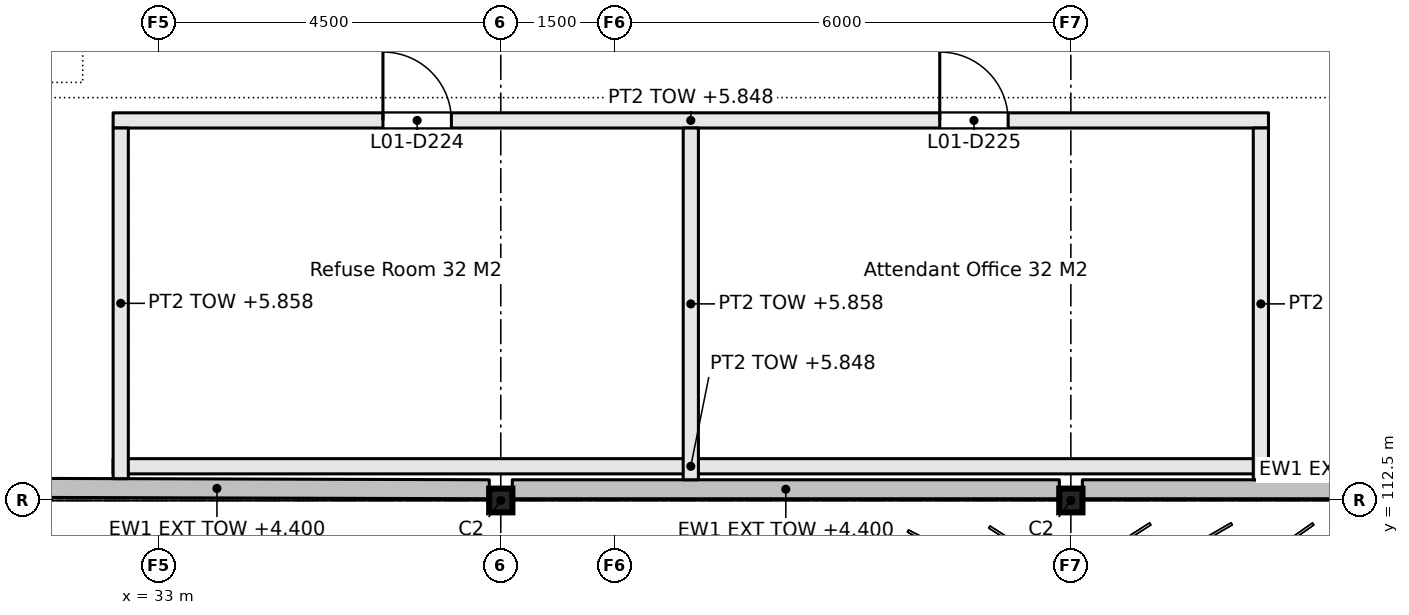
"""IFC4 building model, lengths in metres.
Left out: names, types, materials, properties, quantities, classifications, styles, units other than length and angle.
Written with IfcOpenShell. Run it as: python <this file> out.ifc"""

import sys

from ifc_helpers import new_model, si_unit, direction, frame, frame_2d, origin, origin_2d, place, context, subcontext, project, spatial, rectangle, i_section, extrude, element, fill, save


model = new_model("IFC4")
c1 = context("Model", 3, precision=1e-05, world=origin(), true_north=direction((0.0, 1.0)))
c2 = subcontext(c1, "Body", "Model", "MODEL_VIEW")
j1 = project(units=[si_unit("LENGTHUNIT", "METRE"), si_unit("PLANEANGLEUNIT", "RADIAN")], contexts=[c1])
p1 = place(None, origin())
s1 = spatial("IfcSite", under=j1, at=p1, CompositionType="ELEMENT")
p2 = place(p1, origin())
s2 = spatial("IfcBuilding", under=s1, at=p2, CompositionType="ELEMENT")
p3 = place(p2, frame((0.0, 0.0, 3.3)))
s3 = spatial("IfcBuildingStorey", under=s2, at=p3, CompositionType="ELEMENT", Elevation=3.3)
for number, where, z_axis, x_axis in (
    (1, (37.5, 112.5, 0.0), (0.0, 0.0, 1.0), (1.0, 0.0, 0.0)),
    (2, (45.0, 112.5, 0.0), (0.0, 0.0, 1.0), (1.0, 0.0, 0.0)),
):
    element("IfcColumn", number, at=place(p3, frame(where, z_axis=z_axis, x_axis=x_axis)), inside=s3, PredefinedType="COLUMN", context=c2, shape_type="SweptSolid", body=[
        extrude(i_section(OverallWidth=0.305, OverallDepth=0.312, WebThickness=0.011, FlangeThickness=0.017, FilletRadius=0.015, at=origin_2d()), origin(), (0.0, 0.0, 1.0), 3.3),
    ])
p4 = place(p3, frame((32.4, 112.95, 0.0), z_axis=(0.0, 0.0, 1.0), x_axis=(1.0, 0.0, 0.0)))
e3 = element("IfcWall", 3, at=p4, inside=s3, PredefinedType="PARTITIONING", context=c2, shape_type="SweptSolid", body=[
    extrude(rectangle(XDim=15.2, YDim=0.2, at=frame_2d((7.6, 0.0))), origin(), (0.0, 0.0, 1.0), 2.548),
])
p5 = place(p3, frame((32.4, 117.5, 0.0), z_axis=(0.0, 0.0, 1.0), x_axis=(1.0, 0.0, 0.0)))
e4 = element("IfcWall", 4, at=p5, inside=s3, PredefinedType="PARTITIONING", context=c2, shape_type="SweptSolid", body=[
    extrude(rectangle(XDim=15.2, YDim=0.2, at=frame_2d((7.6, 0.0))), origin(), (0.0, 0.0, 1.0), 2.548),
])
p6 = place(p5, frame((3.55, 0.0, 0.0)))
e5 = element("IfcOpeningElement", 5, at=p6, cuts=e4, PredefinedType="OPENING", context=c2, shape_type="SweptSolid", body=[
    extrude(rectangle(XDim=0.9, YDim=2.1, at=frame_2d((0.45, 1.05))), frame((0.0, 0.11, 0.0), z_axis=(0.0, -1.0, 0.0), x_axis=(1.0, 0.0, 0.0)), (0.0, 0.0, 1.0), 0.22),
])
p7 = place(p5, frame((10.875, 0.0, 0.0)))
e6 = element("IfcOpeningElement", 6, at=p7, cuts=e4, PredefinedType="OPENING", context=c2, shape_type="SweptSolid", body=[
    extrude(rectangle(XDim=0.9, YDim=2.1, at=frame_2d((0.45, 1.05))), frame((0.0, 0.11, 0.0), z_axis=(0.0, -1.0, 0.0), x_axis=(1.0, 0.0, 0.0)), (0.0, 0.0, 1.0), 0.22),
])
p8 = place(p3, frame((32.5, 112.787, 0.0), z_axis=(0.0, 0.0, 1.0), x_axis=(0.0, 1.0, 0.0)))
e7 = element("IfcWall", 7, at=p8, inside=s3, PredefinedType="PARTITIONING", context=c2, shape_type="SweptSolid", body=[
    extrude(rectangle(XDim=4.613, YDim=0.2, at=frame_2d((2.306, 0.0))), origin(), (0.0, 0.0, 1.0), 2.558),
])
for number, where, z_axis, x_axis in (
    (8, (40.0, 112.772, 0.0), (0.0, 0.0, 1.0), (0.0, 1.0, 0.0)),
    (9, (47.5, 112.772, 0.0), (0.0, 0.0, 1.0), (0.0, 1.0, 0.0)),
):
    element("IfcWall", number, at=place(p3, frame(where, z_axis=z_axis, x_axis=x_axis)), inside=s3, PredefinedType="PARTITIONING", context=c2, shape_type="SweptSolid", body=[
        extrude(rectangle(XDim=4.627, YDim=0.2, at=frame_2d((2.314, 0.0))), origin(), (0.0, 0.0, 1.0), 2.558),
    ])
p9 = place(p3, frame((30.183, 112.669, 0.0), z_axis=(0.0, 0.0, 1.0), x_axis=(0.999995504833, -0.002998385104, 0.0)))
e10 = element("IfcWall", 10, at=p9, inside=s3, PredefinedType="SOLIDWALL", context=c2, shape_type="SweptSolid", body=[
    extrude(rectangle(XDim=7.165, YDim=0.25, at=frame_2d((3.583, 0.0))), origin(), (0.0, 0.0, 1.0), 1.1),
])
for number, where, z_axis, x_axis in (
    (11, (37.652, 112.647, 0.0), (0.0, 0.0, 1.0), (1.0, 0.0, 0.0)),
    (12, (45.152, 112.647, 0.0), (0.0, 0.0, 1.0), (1.0, 0.0, 0.0)),
):
    element("IfcWall", number, at=place(p3, frame(where, z_axis=z_axis, x_axis=x_axis)), inside=s3, PredefinedType="SOLIDWALL", context=c2, shape_type="SweptSolid", body=[
        extrude(rectangle(XDim=7.197, YDim=0.25, at=frame_2d((3.598, 0.0))), origin(), (0.0, 0.0, 1.0), 1.1),
    ])
p10 = place(p6, origin())
e13 = element("IfcDoor", 13, at=p10, inside=s3, OperationType="SINGLE_SWING_LEFT", PredefinedType="DOOR", context=c2, shape_type="SweptSolid", body=[
    extrude(rectangle(XDim=0.9, YDim=2.1, at=frame_2d((0.45, 1.05))), frame((0.0, 0.025, 0.0), z_axis=(0.0, -1.0, 0.0), x_axis=(1.0, 0.0, 0.0)), (0.0, 0.0, 1.0), 0.05),
])
fill(e5, e13)
p11 = place(p7, origin())
e14 = element("IfcDoor", 14, at=p11, inside=s3, OperationType="SINGLE_SWING_RIGHT", PredefinedType="DOOR", context=c2, shape_type="SweptSolid", body=[
    extrude(rectangle(XDim=0.9, YDim=2.1, at=frame_2d((0.45, 1.05))), frame((0.0, 0.025, 0.0), z_axis=(0.0, -1.0, 0.0), x_axis=(1.0, 0.0, 0.0)), (0.0, 0.0, 1.0), 0.05),
])
fill(e6, e14)
save(model, sys.argv[1])
